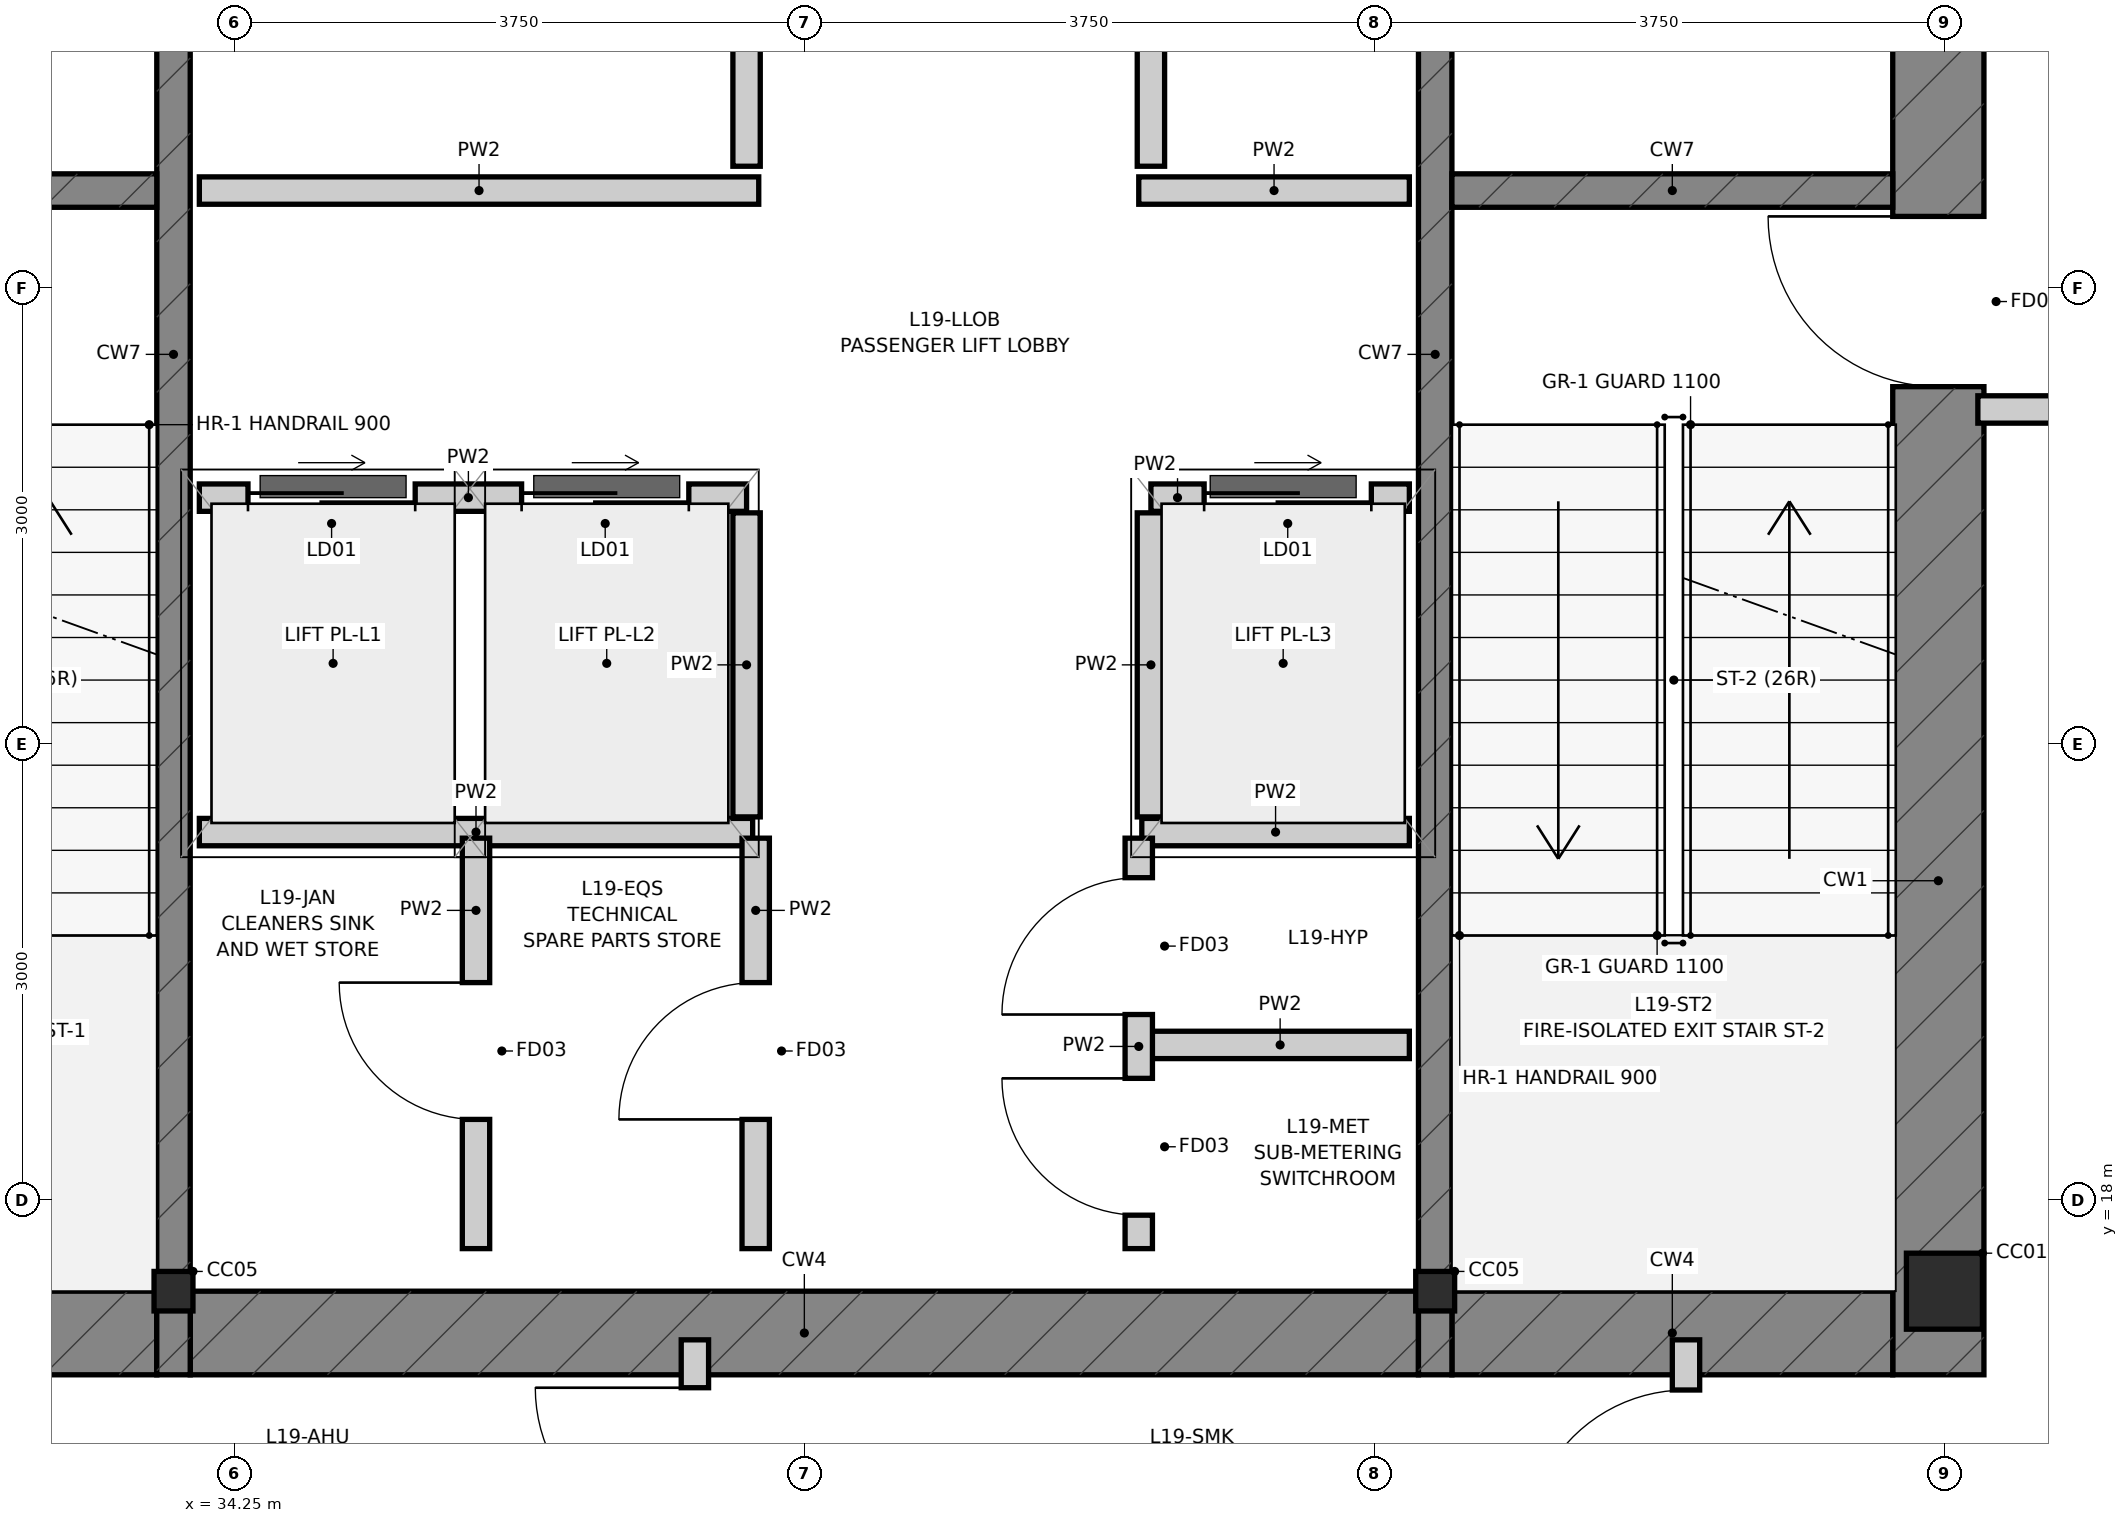
"""IFC4 building model, lengths in metres.
Left out: names, types, materials, properties, quantities, classifications, styles, units other than length and angle.
Written with IfcOpenShell. Run it as: python <this file> out.ifc"""

import sys

from ifc_helpers import new_model, si_unit, direction, frame, frame_2d, origin, origin_2d, place, context, subcontext, project, spatial, rectangle, i_section, extrude, source, transform, mapped, element, fill, save


model = new_model("IFC4")
c1 = context("Model", 3, precision=1e-05, world=origin(), true_north=direction((0.0, 1.0)))
c2 = subcontext(c1, "Body", "Model", "MODEL_VIEW")
j1 = project(units=[si_unit("LENGTHUNIT", "METRE"), si_unit("PLANEANGLEUNIT", "RADIAN")], contexts=[c1])
p1 = place(None, origin())
s1 = spatial("IfcSite", under=j1, at=p1, CompositionType="ELEMENT")
p2 = place(p1, origin())
s2 = spatial("IfcBuilding", under=s1, at=p2, CompositionType="ELEMENT")
p3 = place(p2, frame((0.0, 0.0, 75.05)))
s3 = spatial("IfcBuildingStorey", under=s2, at=p3, CompositionType="ELEMENT", Elevation=75.05)
m1 = source(origin(), c2, "Body", "SweptSolid", [
    extrude(i_section(OverallWidth=0.5, OverallDepth=0.5, WebThickness=0.028, FlangeThickness=0.04, at=origin_2d()), origin(), (0.0, 0.0, 1.0), 4.8),
])
p4 = place(p3, frame((45.5, 17.4, 0.0), z_axis=(0.0, 0.0, 1.0), x_axis=(1.0, 0.0, 0.0)))
e1 = element("IfcColumn", 1, at=p4, inside=s3, PredefinedType="COLUMN", context=c2, shape_type="MappedRepresentation", body=[
    mapped(m1, transform((0.0, 0.0, 0.0), scale=1.0)),
])
m2 = source(origin(), c2, "Body", "SweptSolid", [
    extrude(i_section(OverallWidth=0.256, OverallDepth=0.26, WebThickness=0.01, FlangeThickness=0.017, at=origin_2d()), origin(), (0.0, 0.0, 1.0), 4.8),
])
for number, where, z_axis, x_axis in (
    (2, (33.85, 17.4, 0.0), (0.0, 0.0, 1.0), (1.0, 0.0, 0.0)),
    (3, (42.15, 17.4, 0.0), (0.0, 0.0, 1.0), (1.0, 0.0, 0.0)),
):
    element("IfcColumn", number, at=place(p3, frame(where, z_axis=z_axis, x_axis=x_axis)), inside=s3, PredefinedType="COLUMN", context=c2, shape_type="MappedRepresentation", body=[
        mapped(m2, transform((0.0, 0.0, 0.0), scale=1.0)),
    ])
p5 = place(p3, frame((45.46, 16.85, 0.0), z_axis=(0.0, 0.0, 1.0), x_axis=(0.0, 1.0, 0.0)))
e4 = element("IfcWall", 4, at=p5, inside=s3, PredefinedType="SHEAR", context=c2, shape_type="SweptSolid", body=[
    extrude(rectangle(XDim=13.425, YDim=0.6, at=frame_2d((6.712, 0.0))), origin(), (0.0, 0.0, 1.0), 4.8),
])
p6 = place(p5, frame((6.5, 0.0, 0.0)))
e5 = element("IfcOpeningElement", 5, at=p6, cuts=e4, PredefinedType="OPENING", context=c2, shape_type="SweptSolid", body=[
    extrude(rectangle(XDim=1.12, YDim=2.15, at=frame_2d((0.56, 1.075))), frame((0.0, 0.312, 0.0), z_axis=(0.0, -1.0, 0.0), x_axis=(1.0, 0.0, 0.0)), (0.0, 0.0, 1.0), 0.624),
])
p7 = place(p5, frame((10.95, 0.0, 0.0)))
e6 = element("IfcOpeningElement", 6, at=p7, cuts=e4, PredefinedType="OPENING", context=c2, shape_type="SweptSolid", body=[
    extrude(rectangle(XDim=1.2, YDim=2.2, at=frame_2d((0.6, 1.1))), frame((0.0, 0.312, 0.0), z_axis=(0.0, -1.0, 0.0), x_axis=(1.0, 0.0, 0.0)), (0.0, 0.0, 1.0), 0.624),
])
p8 = place(p3, frame((30.84, 17.125, 0.0), z_axis=(0.0, 0.0, 1.0), x_axis=(1.0, 0.0, 0.0)))
e7 = element("IfcWall", 7, at=p8, inside=s3, PredefinedType="SHEAR", context=c2, shape_type="SweptSolid", body=[
    extrude(rectangle(XDim=2.9, YDim=0.55, at=frame_2d((1.45, 0.0))), origin(), (0.0, 0.0, 1.0), 4.8),
])
p9 = place(p3, frame((33.96, 17.125, 0.0), z_axis=(0.0, 0.0, 1.0), x_axis=(1.0, 0.0, 0.0)))
e8 = element("IfcWall", 8, at=p9, inside=s3, PredefinedType="SHEAR", context=c2, shape_type="SweptSolid", body=[
    extrude(rectangle(XDim=8.08, YDim=0.55, at=frame_2d((4.04, 0.0))), origin(), (0.0, 0.0, 1.0), 4.8),
])
p10 = place(p3, frame((42.26, 17.125, 0.0), z_axis=(0.0, 0.0, 1.0), x_axis=(1.0, 0.0, 0.0)))
e9 = element("IfcWall", 9, at=p10, inside=s3, PredefinedType="SHEAR", context=c2, shape_type="SweptSolid", body=[
    extrude(rectangle(XDim=2.9, YDim=0.55, at=frame_2d((1.45, 0.0))), origin(), (0.0, 0.0, 1.0), 4.8),
])
for number, where, z_axis, x_axis in (
    (10, (33.85, 16.85, 0.0), (0.0, 0.0, 1.0), (0.0, 1.0, 0.0)),
    (11, (42.15, 16.85, 0.0), (0.0, 0.0, 1.0), (0.0, 1.0, 0.0)),
):
    element("IfcWall", number, at=place(p3, frame(where, z_axis=z_axis, x_axis=x_axis)), inside=s3, PredefinedType="SHEAR", context=c2, shape_type="SweptSolid", body=[
        extrude(rectangle(XDim=13.425, YDim=0.22, at=frame_2d((6.712, 0.0))), origin(), (0.0, 0.0, 1.0), 4.8),
    ])
for number, where, z_axis, x_axis in (
    (12, (30.84, 24.64, 0.0), (0.0, 0.0, 1.0), (1.0, 0.0, 0.0)),
    (13, (42.26, 24.64, 0.0), (0.0, 0.0, 1.0), (1.0, 0.0, 0.0)),
):
    element("IfcWall", number, at=place(p3, frame(where, z_axis=z_axis, x_axis=x_axis)), inside=s3, PredefinedType="SHEAR", context=c2, shape_type="SweptSolid", body=[
        extrude(rectangle(XDim=2.9, YDim=0.22, at=frame_2d((1.45, 0.0))), origin(), (0.0, 0.0, 1.0), 4.8),
    ])
p11 = place(p3, frame((34.02, 22.62, 0.0), z_axis=(0.0, 0.0, 1.0), x_axis=(1.0, 0.0, 0.0)))
e14 = element("IfcWall", 14, at=p11, inside=s3, PredefinedType="PARTITIONING", context=c2, shape_type="SweptSolid", body=[
    extrude(rectangle(XDim=3.6, YDim=0.18, at=frame_2d((1.8, 0.0))), origin(), (0.0, 0.0, 1.0), 4.55),
])
p12 = place(p11, frame((0.32, 0.0, 0.0)))
e15 = element("IfcOpeningElement", 15, at=p12, cuts=e14, PredefinedType="OPENING", context=c2, shape_type="SweptSolid", body=[
    extrude(rectangle(XDim=1.1, YDim=2.2, at=frame_2d((0.55, 1.1))), frame((0.0, 0.102, 0.0), z_axis=(0.0, -1.0, 0.0), x_axis=(1.0, 0.0, 0.0)), (0.0, 0.0, 1.0), 0.204),
])
p13 = place(p11, frame((2.12, 0.0, 0.0)))
e16 = element("IfcOpeningElement", 16, at=p13, cuts=e14, PredefinedType="OPENING", context=c2, shape_type="SweptSolid", body=[
    extrude(rectangle(XDim=1.1, YDim=2.2, at=frame_2d((0.55, 1.1))), frame((0.0, 0.102, 0.0), z_axis=(0.0, -1.0, 0.0), x_axis=(1.0, 0.0, 0.0)), (0.0, 0.0, 1.0), 0.204),
])
p14 = place(p3, frame((40.28, 22.62, 0.0), z_axis=(0.0, 0.0, 1.0), x_axis=(1.0, 0.0, 0.0)))
e17 = element("IfcWall", 17, at=p14, inside=s3, PredefinedType="PARTITIONING", context=c2, shape_type="SweptSolid", body=[
    extrude(rectangle(XDim=1.7, YDim=0.18, at=frame_2d((0.85, 0.0))), origin(), (0.0, 0.0, 1.0), 4.55),
])
p15 = place(p14, frame((0.35, 0.0, 0.0)))
e18 = element("IfcOpeningElement", 18, at=p15, cuts=e17, PredefinedType="OPENING", context=c2, shape_type="SweptSolid", body=[
    extrude(rectangle(XDim=1.1, YDim=2.2, at=frame_2d((0.55, 1.1))), frame((0.0, 0.102, 0.0), z_axis=(0.0, -1.0, 0.0), x_axis=(1.0, 0.0, 0.0)), (0.0, 0.0, 1.0), 0.204),
])
for number, where, z_axis, x_axis in (
    (19, (37.62, 20.52, 0.0), (0.0, 0.0, 1.0), (0.0, 1.0, 0.0)),
    (20, (40.28, 20.52, 0.0), (0.0, 0.0, 1.0), (0.0, 1.0, 0.0)),
    (21, (37.62, 24.8, 0.0), (0.0, 0.0, 1.0), (0.0, 1.0, 0.0)),
    (22, (40.28, 24.8, 0.0), (0.0, 0.0, 1.0), (0.0, 1.0, 0.0)),
):
    element("IfcWall", number, at=place(p3, frame(where, z_axis=z_axis, x_axis=x_axis)), inside=s3, PredefinedType="PARTITIONING", context=c2, shape_type="SweptSolid", body=[
        extrude(rectangle(XDim=2.0, YDim=0.18, at=frame_2d((1.0, 0.0))), origin(), (0.0, 0.0, 1.0), 4.55),
    ])
p16 = place(p3, frame((34.02, 24.64, 0.0), z_axis=(0.0, 0.0, 1.0), x_axis=(1.0, 0.0, 0.0)))
e23 = element("IfcWall", 23, at=p16, inside=s3, PredefinedType="PARTITIONING", context=c2, shape_type="SweptSolid", body=[
    extrude(rectangle(XDim=3.68, YDim=0.18, at=frame_2d((1.84, 0.0))), origin(), (0.0, 0.0, 1.0), 4.55),
])
p17 = place(p3, frame((40.2, 24.64, 0.0), z_axis=(0.0, 0.0, 1.0), x_axis=(1.0, 0.0, 0.0)))
e24 = element("IfcWall", 24, at=p17, inside=s3, PredefinedType="PARTITIONING", context=c2, shape_type="SweptSolid", body=[
    extrude(rectangle(XDim=1.78, YDim=0.18, at=frame_2d((0.89, 0.0))), origin(), (0.0, 0.0, 1.0), 4.55),
])
p18 = place(p3, frame((45.72, 23.2, 0.0), z_axis=(0.0, 0.0, 1.0), x_axis=(1.0, 0.0, 0.0)))
e25 = element("IfcWall", 25, at=p18, inside=s3, PredefinedType="PARTITIONING", context=c2, shape_type="SweptSolid", body=[
    extrude(rectangle(XDim=3.215, YDim=0.18, at=frame_2d((1.607, 0.0))), origin(), (0.0, 0.0, 1.0), 4.55),
])
p19 = place(p18, frame((0.75, 0.0, 0.0)))
e26 = element("IfcOpeningElement", 26, at=p19, cuts=e25, PredefinedType="OPENING", context=c2, shape_type="SweptSolid", body=[
    extrude(rectangle(XDim=1.05, YDim=2.15, at=frame_2d((0.525, 1.075))), frame((0.0, 0.102, 0.0), z_axis=(0.0, -1.0, 0.0), x_axis=(1.0, 0.0, 0.0)), (0.0, 0.0, 1.0), 0.204),
])
p20 = place(p3, frame((34.02, 20.42, 0.0), z_axis=(0.0, 0.0, 1.0), x_axis=(1.0, 0.0, 0.0)))
e27 = element("IfcWall", 27, at=p20, inside=s3, PredefinedType="PARTITIONING", context=c2, shape_type="SweptSolid", body=[
    extrude(rectangle(XDim=3.64, YDim=0.18, at=frame_2d((1.82, 0.0))), origin(), (0.0, 0.0, 1.0), 4.55),
])
p21 = place(p3, frame((40.22, 20.42, 0.0), z_axis=(0.0, 0.0, 1.0), x_axis=(1.0, 0.0, 0.0)))
e28 = element("IfcWall", 28, at=p21, inside=s3, PredefinedType="PARTITIONING", context=c2, shape_type="SweptSolid", body=[
    extrude(rectangle(XDim=1.76, YDim=0.18, at=frame_2d((0.88, 0.0))), origin(), (0.0, 0.0, 1.0), 4.55),
])
p22 = place(p3, frame((35.84, 17.68, 0.0), z_axis=(0.0, 0.0, 1.0), x_axis=(0.0, 1.0, 0.0)))
e29 = element("IfcWall", 29, at=p22, inside=s3, PredefinedType="PARTITIONING", context=c2, shape_type="SweptSolid", body=[
    extrude(rectangle(XDim=2.7, YDim=0.18, at=frame_2d((1.35, 0.0))), origin(), (0.0, 0.0, 1.0), 4.55),
])
p23 = place(p22, frame((0.85, 0.0, 0.0)))
e30 = element("IfcOpeningElement", 30, at=p23, cuts=e29, PredefinedType="OPENING", context=c2, shape_type="SweptSolid", body=[
    extrude(rectangle(XDim=0.9, YDim=2.1, at=frame_2d((0.45, 1.05))), frame((0.0, 0.102, 0.0), z_axis=(0.0, -1.0, 0.0), x_axis=(1.0, 0.0, 0.0)), (0.0, 0.0, 1.0), 0.204),
])
p24 = place(p3, frame((37.68, 17.68, 0.0), z_axis=(0.0, 0.0, 1.0), x_axis=(0.0, 1.0, 0.0)))
e31 = element("IfcWall", 31, at=p24, inside=s3, PredefinedType="PARTITIONING", context=c2, shape_type="SweptSolid", body=[
    extrude(rectangle(XDim=2.7, YDim=0.18, at=frame_2d((1.35, 0.0))), origin(), (0.0, 0.0, 1.0), 4.55),
])
p25 = place(p24, frame((0.85, 0.0, 0.0)))
e32 = element("IfcOpeningElement", 32, at=p25, cuts=e31, PredefinedType="OPENING", context=c2, shape_type="SweptSolid", body=[
    extrude(rectangle(XDim=0.9, YDim=2.1, at=frame_2d((0.45, 1.05))), frame((0.0, 0.102, 0.0), z_axis=(0.0, -1.0, 0.0), x_axis=(1.0, 0.0, 0.0)), (0.0, 0.0, 1.0), 0.204),
])
p26 = place(p3, frame((40.28, 19.02, 0.0), z_axis=(0.0, 0.0, 1.0), x_axis=(1.0, 0.0, 0.0)))
e33 = element("IfcWall", 33, at=p26, inside=s3, PredefinedType="PARTITIONING", context=c2, shape_type="SweptSolid", body=[
    extrude(rectangle(XDim=1.7, YDim=0.18, at=frame_2d((0.85, 0.0))), origin(), (0.0, 0.0, 1.0), 4.55),
])
p27 = place(p3, frame((40.2, 17.68, 0.0), z_axis=(0.0, 0.0, 1.0), x_axis=(0.0, 1.0, 0.0)))
e34 = element("IfcWall", 34, at=p27, inside=s3, PredefinedType="PARTITIONING", context=c2, shape_type="SweptSolid", body=[
    extrude(rectangle(XDim=2.7, YDim=0.18, at=frame_2d((1.35, 0.0))), origin(), (0.0, 0.0, 1.0), 4.55),
])
p28 = place(p27, frame((0.22, 0.0, 0.0)))
e35 = element("IfcOpeningElement", 35, at=p28, cuts=e34, PredefinedType="OPENING", context=c2, shape_type="SweptSolid", body=[
    extrude(rectangle(XDim=0.9, YDim=2.1, at=frame_2d((0.45, 1.05))), frame((0.0, 0.102, 0.0), z_axis=(0.0, -1.0, 0.0), x_axis=(1.0, 0.0, 0.0)), (0.0, 0.0, 1.0), 0.204),
])
p29 = place(p27, frame((1.54, 0.0, 0.0)))
e36 = element("IfcOpeningElement", 36, at=p29, cuts=e34, PredefinedType="OPENING", context=c2, shape_type="SweptSolid", body=[
    extrude(rectangle(XDim=0.9, YDim=2.1, at=frame_2d((0.45, 1.05))), frame((0.0, 0.102, 0.0), z_axis=(0.0, -1.0, 0.0), x_axis=(1.0, 0.0, 0.0)), (0.0, 0.0, 1.0), 0.204),
])
p30 = place(p3, frame((43.8, 15.45, 0.0), z_axis=(0.0, 0.0, 1.0), x_axis=(0.0, 1.0, 0.0)))
e37 = element("IfcWall", 37, at=p30, inside=s3, PredefinedType="PARTITIONING", context=c2, shape_type="SweptSolid", body=[
    extrude(rectangle(XDim=1.63, YDim=0.18, at=frame_2d((0.815, 0.0))), origin(), (0.0, 0.0, 1.0), 4.55),
])
p31 = place(p30, frame((0.25, 0.0, 0.0)))
e38 = element("IfcOpeningElement", 38, at=p31, cuts=e37, PredefinedType="OPENING", context=c2, shape_type="SweptSolid", body=[
    extrude(rectangle(XDim=1.05, YDim=2.15, at=frame_2d((0.525, 1.075))), frame((0.0, 0.102, 0.0), z_axis=(0.0, -1.0, 0.0), x_axis=(1.0, 0.0, 0.0)), (0.0, 0.0, 1.0), 0.204),
])
p32 = place(p3, frame((37.28, 15.465, 0.0), z_axis=(0.0, 0.0, 1.0), x_axis=(0.0, 1.0, 0.0)))
e39 = element("IfcWall", 39, at=p32, inside=s3, PredefinedType="PARTITIONING", context=c2, shape_type="SweptSolid", body=[
    extrude(rectangle(XDim=1.615, YDim=0.18, at=frame_2d((0.808, 0.0))), origin(), (0.0, 0.0, 1.0), 4.55),
])
p33 = place(p32, frame((0.25, 0.0, 0.0)))
e40 = element("IfcOpeningElement", 40, at=p33, cuts=e39, PredefinedType="OPENING", context=c2, shape_type="SweptSolid", body=[
    extrude(rectangle(XDim=1.05, YDim=2.15, at=frame_2d((0.525, 1.075))), frame((0.0, 0.102, 0.0), z_axis=(0.0, -1.0, 0.0), x_axis=(1.0, 0.0, 0.0)), (0.0, 0.0, 1.0), 0.204),
])
p34 = place(p6, origin())
e41 = element("IfcDoor", 41, at=p34, inside=s3, OperationType="SINGLE_SWING_RIGHT", PredefinedType="DOOR", context=c2, shape_type="SweptSolid", body=[
    extrude(rectangle(XDim=1.12, YDim=2.15, at=frame_2d((0.56, 1.075))), frame((0.0, 0.025, 0.0), z_axis=(0.0, -1.0, 0.0), x_axis=(1.0, 0.0, 0.0)), (0.0, 0.0, 1.0), 0.05),
])
fill(e5, e41)
p35 = place(p12, origin())
e42 = element("IfcDoor", 42, at=p35, inside=s3, OperationType="SLIDING_TO_LEFT", PredefinedType="DOOR", context=c2, shape_type="SweptSolid", body=[
    extrude(rectangle(XDim=1.1, YDim=2.2, at=frame_2d((0.55, 1.1))), frame((0.0, 0.025, 0.0), z_axis=(0.0, -1.0, 0.0), x_axis=(1.0, 0.0, 0.0)), (0.0, 0.0, 1.0), 0.05),
])
fill(e15, e42)
p36 = place(p13, origin())
e43 = element("IfcDoor", 43, at=p36, inside=s3, OperationType="SLIDING_TO_RIGHT", PredefinedType="DOOR", context=c2, shape_type="SweptSolid", body=[
    extrude(rectangle(XDim=1.1, YDim=2.2, at=frame_2d((0.55, 1.1))), frame((0.0, 0.025, 0.0), z_axis=(0.0, -1.0, 0.0), x_axis=(1.0, 0.0, 0.0)), (0.0, 0.0, 1.0), 0.05),
])
fill(e16, e43)
p37 = place(p15, origin())
e44 = element("IfcDoor", 44, at=p37, inside=s3, OperationType="SLIDING_TO_LEFT", PredefinedType="DOOR", context=c2, shape_type="SweptSolid", body=[
    extrude(rectangle(XDim=1.1, YDim=2.2, at=frame_2d((0.55, 1.1))), frame((0.0, 0.025, 0.0), z_axis=(0.0, -1.0, 0.0), x_axis=(1.0, 0.0, 0.0)), (0.0, 0.0, 1.0), 0.05),
])
fill(e18, e44)
p38 = place(p23, origin())
e45 = element("IfcDoor", 45, at=p38, inside=s3, OperationType="SINGLE_SWING_RIGHT", PredefinedType="DOOR", context=c2, shape_type="SweptSolid", body=[
    extrude(rectangle(XDim=0.9, YDim=2.1, at=frame_2d((0.45, 1.05))), frame((0.0, 0.025, 0.0), z_axis=(0.0, -1.0, 0.0), x_axis=(1.0, 0.0, 0.0)), (0.0, 0.0, 1.0), 0.05),
])
fill(e30, e45)
p39 = place(p25, origin())
e46 = element("IfcDoor", 46, at=p39, inside=s3, OperationType="SINGLE_SWING_LEFT", PredefinedType="DOOR", context=c2, shape_type="SweptSolid", body=[
    extrude(rectangle(XDim=0.9, YDim=2.1, at=frame_2d((0.45, 1.05))), frame((0.0, 0.025, 0.0), z_axis=(0.0, -1.0, 0.0), x_axis=(1.0, 0.0, 0.0)), (0.0, 0.0, 1.0), 0.05),
])
fill(e32, e46)
p40 = place(p28, origin())
e47 = element("IfcDoor", 47, at=p40, inside=s3, OperationType="SINGLE_SWING_RIGHT", PredefinedType="DOOR", context=c2, shape_type="SweptSolid", body=[
    extrude(rectangle(XDim=0.9, YDim=2.1, at=frame_2d((0.45, 1.05))), frame((0.0, 0.025, 0.0), z_axis=(0.0, -1.0, 0.0), x_axis=(1.0, 0.0, 0.0)), (0.0, 0.0, 1.0), 0.05),
])
fill(e35, e47)
p41 = place(p29, origin())
e48 = element("IfcDoor", 48, at=p41, inside=s3, OperationType="SINGLE_SWING_LEFT", PredefinedType="DOOR", context=c2, shape_type="SweptSolid", body=[
    extrude(rectangle(XDim=0.9, YDim=2.1, at=frame_2d((0.45, 1.05))), frame((0.0, 0.025, 0.0), z_axis=(0.0, -1.0, 0.0), x_axis=(1.0, 0.0, 0.0)), (0.0, 0.0, 1.0), 0.05),
])
fill(e36, e48)
p42 = place(p31, origin())
e49 = element("IfcDoor", 49, at=p42, inside=s3, OperationType="SINGLE_SWING_LEFT", PredefinedType="DOOR", context=c2, shape_type="SweptSolid", body=[
    extrude(rectangle(XDim=1.05, YDim=2.15, at=frame_2d((0.525, 1.075))), frame((0.0, 0.025, 0.0), z_axis=(0.0, -1.0, 0.0), x_axis=(1.0, 0.0, 0.0)), (0.0, 0.0, 1.0), 0.05),
])
fill(e38, e49)
p43 = place(p33, origin())
e50 = element("IfcDoor", 50, at=p43, inside=s3, OperationType="SINGLE_SWING_RIGHT", PredefinedType="DOOR", context=c2, shape_type="SweptSolid", body=[
    extrude(rectangle(XDim=1.05, YDim=2.15, at=frame_2d((0.525, 1.075))), frame((0.0, 0.025, 0.0), z_axis=(0.0, -1.0, 0.0), x_axis=(1.0, 0.0, 0.0)), (0.0, 0.0, 1.0), 0.05),
])
fill(e40, e50)
save(model, sys.argv[1])
